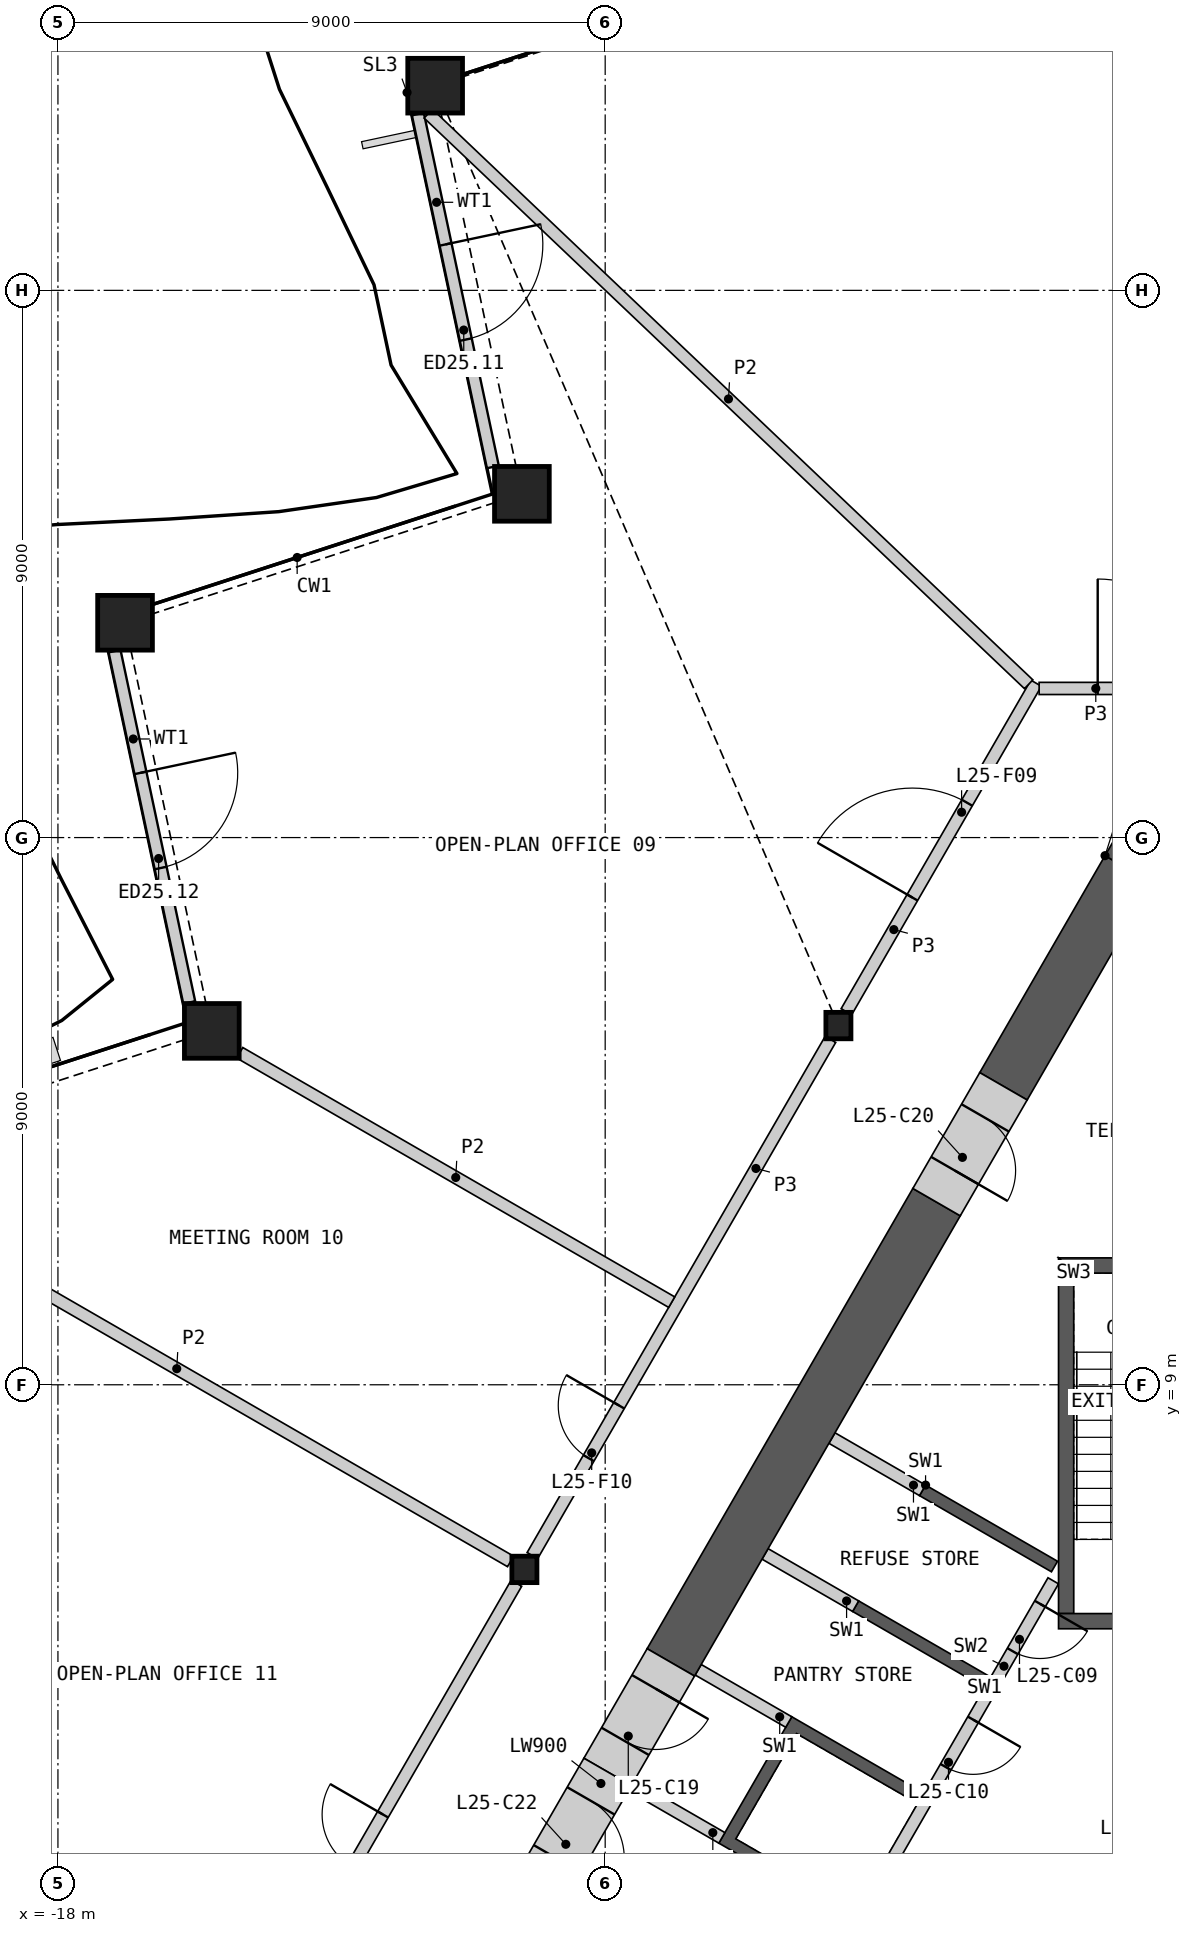
"""IFC4 building model, lengths in metres.
Left out: names, types, materials, properties, quantities, classifications, styles, units other than length and angle.
Written with IfcOpenShell. Run it as: python <this file> out.ifc"""

import sys

from ifc_helpers import new_model, si_unit, direction, frame, frame_2d, origin, origin_2d, place, context, subcontext, project, spatial, polyline, rectangle, hollow_rectangle, i_section, outline, extrude, element, fill, save


model = new_model("IFC4")
c1 = context("Model", 3, precision=1e-05, world=origin(), true_north=direction((0.0, 1.0)))
c2 = subcontext(c1, "Body", "Model", "MODEL_VIEW")
j1 = project(units=[si_unit("LENGTHUNIT", "METRE"), si_unit("PLANEANGLEUNIT", "RADIAN")], contexts=[c1])
p1 = place(None, origin())
s1 = spatial("IfcSite", under=j1, at=p1, CompositionType="ELEMENT")
p2 = place(p1, origin())
s2 = spatial("IfcBuilding", under=s1, at=p2, CompositionType="ELEMENT")
p3 = place(p2, frame((0.0, 0.0, 120.6)))
s3 = spatial("IfcBuildingStorey", under=s2, at=p3, CompositionType="ELEMENT", Elevation=120.6)
for number, where, z_axis, x_axis in (
    (1, (-11.796, 30.366, 0.0), (0.0, 0.0, 1.0), (1.0, 0.0, 0.0)),
    (2, (-10.37, 23.654, 0.0), (0.0, 0.0, 1.0), (1.0, 0.0, 0.0)),
    (3, (-16.896, 21.533, 0.0), (0.0, 0.0, 1.0), (1.0, 0.0, 0.0)),
    (4, (-15.469, 14.82, 0.0), (0.0, 0.0, 1.0), (1.0, 0.0, 0.0)),
):
    element("IfcColumn", number, at=place(p3, frame(where, z_axis=z_axis, x_axis=x_axis)), inside=s3, PredefinedType="COLUMN", context=c2, shape_type="SweptSolid", body=[
        extrude(hollow_rectangle(XDim=0.9, YDim=0.9, WallThickness=0.06, at=origin_2d()), origin(), (0.0, 0.0, 1.0), 4.2),
    ])
for number, where, z_axis, x_axis in (
    (5, (-5.164, 14.908, 0.0), (0.0, 0.0, 1.0), (1.0, 0.0, 0.0)),
    (6, (-10.328, 5.963, 0.0), (0.0, 0.0, 1.0), (1.0, 0.0, 0.0)),
):
    element("IfcColumn", number, at=place(p3, frame(where, z_axis=z_axis, x_axis=x_axis)), inside=s3, PredefinedType="COLUMN", context=c2, shape_type="SweptSolid", body=[
        extrude(i_section(OverallWidth=0.412, OverallDepth=0.435, WebThickness=0.036, FlangeThickness=0.057, at=origin_2d()), origin(), (0.0, 0.0, 1.0), 4.2),
    ])
p4 = place(p3, frame((-12.081, 29.9, 0.0), z_axis=(0.0, 0.0, 1.0), x_axis=(0.207890739357, -0.97815205387, 0.0)))
e7 = element("IfcWall", 7, at=p4, inside=s3, PredefinedType="SOLIDWALL", context=c2, shape_type="SweptSolid", body=[
    extrude(rectangle(XDim=5.934, YDim=0.2, at=frame_2d((2.967, 0.0))), origin(), (0.0, 0.0, 1.0), 3.189),
])
p5 = place(p4, frame((2.192, 0.0, 0.0)))
e8 = element("IfcOpeningElement", 8, at=p5, cuts=e7, PredefinedType="OPENING", context=c2, shape_type="SweptSolid", body=[
    extrude(rectangle(XDim=1.6, YDim=2.4, at=frame_2d((0.8, 1.2))), frame((0.0, 0.11, 0.0), z_axis=(0.0, -1.0, 0.0), x_axis=(1.0, 0.0, 0.0)), (0.0, 0.0, 1.0), 0.22),
])
p6 = place(p3, frame((-17.069, 21.066, 0.0), z_axis=(0.0, 0.0, 1.0), x_axis=(0.207917562075, -0.978146352741, 0.0)))
e9 = element("IfcWall", 9, at=p6, inside=s3, PredefinedType="SOLIDWALL", context=c2, shape_type="SweptSolid", body=[
    extrude(rectangle(XDim=5.909, YDim=0.2, at=frame_2d((2.954, 0.0))), origin(), (0.0, 0.0, 1.0), 3.189),
])
p7 = place(p6, frame((2.047, 0.0, 0.0)))
e10 = element("IfcOpeningElement", 10, at=p7, cuts=e9, PredefinedType="OPENING", context=c2, shape_type="SweptSolid", body=[
    extrude(rectangle(XDim=1.6, YDim=2.4, at=frame_2d((0.8, 1.2))), frame((0.0, 0.11, 0.0), z_axis=(0.0, -1.0, 0.0), x_axis=(1.0, 0.0, 0.0)), (0.0, 0.0, 1.0), 0.22),
])
p8 = place(p3, origin())
e11 = element("IfcWall", 11, at=p8, inside=s3, PredefinedType="SHEAR", context=c2, shape_type="SweptSolid", body=[
    extrude(outline(polyline([(-4.96, 0.208), (-7.131, 1.461), (-5.931, 3.54), (-3.76, 2.287), (-3.861, 2.113), (-5.852, 3.263), (-6.852, 1.531), (-4.861, 0.381), (-4.96, 0.208)])), origin(), (0.0, 0.0, 1.0), 3.8),
])
p9 = place(p3, origin())
e12 = element("IfcWall", 12, at=p9, inside=s3, PredefinedType="SHEAR", context=c2, shape_type="SweptSolid", body=[
    extrude(outline(polyline([(-2.76, 4.019), (-4.931, 5.272), (-4.831, 5.445), (-2.66, 4.192), (-2.76, 4.019)])), origin(), (0.0, 0.0, 1.0), 3.8),
])
p10 = place(p3, origin())
e13 = element("IfcWall", 13, at=p10, inside=s3, PredefinedType="SHEAR", context=c2, shape_type="SweptSolid", body=[
    extrude(outline(polyline([(-3.731, 7.35), (-1.561, 6.097), (-1.66, 5.924), (-3.831, 7.177), (-3.731, 7.35)])), origin(), (0.0, 0.0, 1.0), 3.8),
])
p11 = place(p3, frame((-1.631, 5.776, 0.0), z_axis=(0.0, 0.0, 1.0), x_axis=(-0.499992876559, -0.866029516466, 0.0)))
e14 = element("IfcWall", 14, at=p11, inside=s3, PredefinedType="SOLIDWALL", context=c2, shape_type="SweptSolid", body=[
    extrude(rectangle(XDim=6.486, YDim=0.2, at=frame_2d((3.243, 0.0))), origin(), (0.0, 0.0, 1.0), 3.8),
])
p12 = place(p11, frame((0.437, 0.0, 0.0)))
e15 = element("IfcOpeningElement", 15, at=p12, cuts=e14, PredefinedType="OPENING", context=c2, shape_type="SweptSolid", body=[
    extrude(rectangle(XDim=0.9, YDim=2.1, at=frame_2d((0.45, 1.05))), frame((0.0, 0.11, 0.0), z_axis=(0.0, -1.0, 0.0), x_axis=(1.0, 0.0, 0.0)), (0.0, 0.0, 1.0), 0.22),
])
p13 = place(p11, frame((2.637, 0.0, 0.0)))
e16 = element("IfcOpeningElement", 16, at=p13, cuts=e14, PredefinedType="OPENING", context=c2, shape_type="SweptSolid", body=[
    extrude(rectangle(XDim=0.9, YDim=2.1, at=frame_2d((0.45, 1.05))), frame((0.0, 0.11, 0.0), z_axis=(0.0, -1.0, 0.0), x_axis=(1.0, 0.0, 0.0)), (0.0, 0.0, 1.0), 0.22),
])
for number, where, z_axis, x_axis in (
    (17, (-3.781, 7.263, 0.0), (0.0, 0.0, 1.0), (-0.866, 0.5, 0.0)),
    (18, (-4.881, 5.358, 0.0), (0.0, 0.0, 1.0), (-0.866, 0.5, 0.0)),
):
    element("IfcWall", number, at=place(p3, frame(where, z_axis=z_axis, x_axis=x_axis)), inside=s3, PredefinedType="SHEAR", context=c2, shape_type="SweptSolid", body=[
        extrude(rectangle(XDim=1.72, YDim=0.2, at=frame_2d((0.86, 0.0))), origin(), (0.0, 0.0, 1.0), 3.8),
    ])
p14 = place(p3, frame((-5.981, 3.453, 0.0), z_axis=(0.0, 0.0, 1.0), x_axis=(-0.866060346521, 0.499939472521, 0.0)))
e19 = element("IfcWall", 19, at=p14, inside=s3, PredefinedType="SHEAR", context=c2, shape_type="SweptSolid", body=[
    extrude(rectangle(XDim=1.72, YDim=0.2, at=frame_2d((0.86, 0.0))), origin(), (0.0, 0.0, 1.0), 3.8),
])
p15 = place(p3, frame((-7.081, 1.548, 0.0), z_axis=(0.0, 0.0, 1.0), x_axis=(-0.865963414263, 0.500107353632, 0.0)))
e20 = element("IfcWall", 20, at=p15, inside=s3, PredefinedType="SHEAR", context=c2, shape_type="SweptSolid", body=[
    extrude(rectangle(XDim=1.72, YDim=0.2, at=frame_2d((0.86, 0.0))), origin(), (0.0, 0.0, 1.0), 3.8),
])
p16 = place(p3, origin())
e21 = element("IfcWall", 21, at=p16, inside=s3, PredefinedType="SHEAR", context=c2, shape_type="SweptSolid", body=[
    extrude(outline(polyline([(1.544, 11.087), (-1.544, 11.087), (-1.294, 10.837), (1.294, 10.837), (1.544, 11.087)])), origin(), (0.0, 0.0, 1.0), 3.8),
])
p17 = place(p3, origin())
e22 = element("IfcWall", 22, at=p17, inside=s3, PredefinedType="SHEAR", context=c2, shape_type="SweptSolid", body=[
    extrude(outline(polyline([(-1.294, 10.837), (-1.544, 11.087), (-1.544, 5.237), (-1.294, 5.237), (-1.294, 10.837)])), origin(), (0.0, 0.0, 1.0), 3.8),
])
p18 = place(p3, frame((1.544, 5.112, 0.0), z_axis=(0.0, 0.0, 1.0), x_axis=(-1.0, 0.0, 0.0)))
e23 = element("IfcWall", 23, at=p18, inside=s3, PredefinedType="SHEAR", context=c2, shape_type="SweptSolid", body=[
    extrude(rectangle(XDim=3.088, YDim=0.25, at=frame_2d((1.544, 0.0))), origin(), (0.0, 0.0, 1.0), 3.8),
])
p19 = place(p18, frame((0.994, 0.0, 0.0)))
e24 = element("IfcOpeningElement", 24, at=p19, cuts=e23, PredefinedType="OPENING", context=c2, shape_type="SweptSolid", body=[
    extrude(rectangle(XDim=1.1, YDim=2.1, at=frame_2d((0.55, 1.05))), frame((0.0, 0.135, 0.0), z_axis=(0.0, -1.0, 0.0), x_axis=(1.0, 0.0, 0.0)), (0.0, 0.0, 1.0), 0.27),
])
p20 = place(p3, frame((-3.55, 12.004, 0.0), z_axis=(0.0, 0.0, 1.0), x_axis=(-0.499993245289, -0.866029303583, 0.0)))
e25 = element("IfcWall", 25, at=p20, inside=s3, PredefinedType="SHEAR", context=c2, shape_type="SweptSolid", body=[
    extrude(rectangle(XDim=8.741, YDim=0.9, at=frame_2d((4.37, 0.0))), origin(), (0.0, 0.0, 1.0), 3.8),
])
p21 = place(p3, frame((-0.39, 17.478, 0.0), z_axis=(0.0, 0.0, 1.0), x_axis=(-0.50001992892, -0.866013897511, 0.0)))
e26 = element("IfcWall", 26, at=p21, inside=s3, PredefinedType="SHEAR", context=c2, shape_type="SweptSolid", body=[
    extrude(rectangle(XDim=4.12, YDim=0.9, at=frame_2d((2.06, 0.0))), origin(), (0.0, 0.0, 1.0), 3.8),
])
p22 = place(p3, origin())
e27 = element("IfcWall", 27, at=p22, inside=s3, PredefinedType="SHEAR", context=c2, shape_type="SweptSolid", body=[
    extrude(outline(polyline([(-0.779, 17.703), (0.0, 19.052), (0.779, 17.703), (0.0, 17.253), (-0.779, 17.703)])), origin(), (0.0, 0.0, 1.0), 3.8),
])
p23 = place(p3, frame((-7.92, 4.434, 0.0), z_axis=(0.0, 0.0, 1.0), x_axis=(-0.499939227269, -0.866060488094, 0.0)))
e28 = element("IfcWall", 28, at=p23, inside=s3, PredefinedType="SHEAR", context=c2, shape_type="SweptSolid", body=[
    extrude(rectangle(XDim=2.08, YDim=0.9, at=frame_2d((1.04, 0.0))), origin(), (0.0, 0.0, 1.0), 3.8),
])
p24 = place(p23, frame((0.5, 0.0, 0.0)))
e29 = element("IfcOpeningElement", 29, at=p24, cuts=e28, PredefinedType="OPENING", context=c2, shape_type="SweptSolid", body=[
    extrude(rectangle(XDim=1.0, YDim=2.1, at=frame_2d((0.5, 1.05))), frame((0.0, 0.46, 0.0), z_axis=(0.0, -1.0, 0.0), x_axis=(1.0, 0.0, 0.0)), (0.0, 0.0, 1.0), 0.92),
])
p25 = place(p3, frame((-2.45, 13.909, 0.0), z_axis=(0.0, 0.0, 1.0), x_axis=(-0.50002983664, -0.866008176907, 0.0)))
e30 = element("IfcWall", 30, at=p25, inside=s3, PredefinedType="SHEAR", context=c2, shape_type="SweptSolid", body=[
    extrude(rectangle(XDim=2.2, YDim=0.9, at=frame_2d((1.1, 0.0))), origin(), (0.0, 0.0, 1.0), 3.8),
])
p26 = place(p25, frame((0.6, 0.0, 0.0)))
e31 = element("IfcOpeningElement", 31, at=p26, cuts=e30, PredefinedType="OPENING", context=c2, shape_type="SweptSolid", body=[
    extrude(rectangle(XDim=1.0, YDim=2.1, at=frame_2d((0.5, 1.05))), frame((0.0, 0.46, 0.0), z_axis=(0.0, -1.0, 0.0), x_axis=(1.0, 0.0, 0.0)), (0.0, 0.0, 1.0), 0.92),
])
p27 = place(p3, frame((-8.96, 2.633, 0.0), z_axis=(0.0, 0.0, 1.0), x_axis=(-0.50002983664, -0.866008176907, 0.0)))
e32 = element("IfcWall", 32, at=p27, inside=s3, PredefinedType="SHEAR", context=c2, shape_type="SweptSolid", body=[
    extrude(rectangle(XDim=2.2, YDim=0.9, at=frame_2d((1.1, 0.0))), origin(), (0.0, 0.0, 1.0), 3.8),
])
p28 = place(p27, frame((0.55, 0.0, 0.0)))
e33 = element("IfcOpeningElement", 33, at=p28, cuts=e32, PredefinedType="OPENING", context=c2, shape_type="SweptSolid", body=[
    extrude(rectangle(XDim=1.1, YDim=2.1, at=frame_2d((0.55, 1.05))), frame((0.0, 0.46, 0.0), z_axis=(0.0, -1.0, 0.0), x_axis=(1.0, 0.0, 0.0)), (0.0, 0.0, 1.0), 0.92),
])
p29 = place(p3, frame((-10.197, 6.19, 0.0), z_axis=(0.0, 0.0, 1.0), x_axis=(0.500012035596, 0.866018454918, 0.0)))
e34 = element("IfcWall", 34, at=p29, inside=s3, PredefinedType="PARTITIONING", context=c2, shape_type="SweptSolid", body=[
    extrude(rectangle(XDim=9.803, YDim=0.2, at=frame_2d((4.902, 0.0))), origin(), (0.0, 0.0, 1.0), 3.8),
])
p30 = place(p29, frame((1.851, 0.0, 0.0)))
e35 = element("IfcOpeningElement", 35, at=p30, cuts=e34, PredefinedType="OPENING", context=c2, shape_type="SweptSolid", body=[
    extrude(rectangle(XDim=1.0, YDim=2.1, at=frame_2d((0.5, 1.05))), frame((0.0, 0.11, 0.0), z_axis=(0.0, -1.0, 0.0), x_axis=(1.0, 0.0, 0.0)), (0.0, 0.0, 1.0), 0.22),
])
p31 = place(p3, frame((-15.402, -2.823, 0.0), z_axis=(0.0, 0.0, 1.0), x_axis=(0.500023237168, 0.866011987384, 0.0)))
e36 = element("IfcWall", 36, at=p31, inside=s3, PredefinedType="PARTITIONING", context=c2, shape_type="SweptSolid", body=[
    extrude(rectangle(XDim=9.883, YDim=0.2, at=frame_2d((4.942, 0.0))), origin(), (0.0, 0.0, 1.0), 3.8),
])
p32 = place(p31, frame((4.492, 0.0, 0.0)))
e37 = element("IfcOpeningElement", 37, at=p32, cuts=e36, PredefinedType="OPENING", context=c2, shape_type="SweptSolid", body=[
    extrude(rectangle(XDim=1.0, YDim=2.1, at=frame_2d((0.5, 1.05))), frame((0.0, 0.11, 0.0), z_axis=(0.0, -1.0, 0.0), x_axis=(1.0, 0.0, 0.0)), (0.0, 0.0, 1.0), 0.22),
])
p33 = place(p3, frame((-5.033, 15.135, 0.0), z_axis=(0.0, 0.0, 1.0), x_axis=(0.499980978912, 0.866036385336, 0.0)))
e38 = element("IfcWall", 38, at=p33, inside=s3, PredefinedType="PARTITIONING", context=c2, shape_type="SweptSolid", body=[
    extrude(rectangle(XDim=6.24, YDim=0.2, at=frame_2d((3.12, 0.0))), origin(), (0.0, 0.0, 1.0), 3.8),
])
p34 = place(p33, frame((2.169, 0.0, 0.0)))
e39 = element("IfcOpeningElement", 39, at=p34, cuts=e38, PredefinedType="OPENING", context=c2, shape_type="SweptSolid", body=[
    extrude(rectangle(XDim=1.8, YDim=2.1, at=frame_2d((0.9, 1.05))), frame((0.0, 0.11, 0.0), z_axis=(0.0, -1.0, 0.0), x_axis=(1.0, 0.0, 0.0)), (0.0, 0.0, 1.0), 0.22),
])
p35 = place(p3, frame((-1.863, 20.453, 0.0), z_axis=(0.0, 0.0, 1.0), x_axis=(1.0, 0.0, 0.0)))
e40 = element("IfcWall", 40, at=p35, inside=s3, PredefinedType="PARTITIONING", context=c2, shape_type="SweptSolid", body=[
    extrude(rectangle(XDim=3.726, YDim=0.2, at=frame_2d((1.863, 0.0))), origin(), (0.0, 0.0, 1.0), 3.8),
])
p36 = place(p35, frame((0.963, 0.0, 0.0)))
e41 = element("IfcOpeningElement", 41, at=p36, cuts=e40, PredefinedType="OPENING", context=c2, shape_type="SweptSolid", body=[
    extrude(rectangle(XDim=1.8, YDim=2.1, at=frame_2d((0.9, 1.05))), frame((0.0, 0.11, 0.0), z_axis=(0.0, -1.0, 0.0), x_axis=(1.0, 0.0, 0.0)), (0.0, 0.0, 1.0), 0.22),
])
p37 = place(p3, frame((-11.909, 29.906, 0.0), z_axis=(0.0, 0.0, 1.0), x_axis=(0.724819524984, -0.688938789881, 0.0)))
e42 = element("IfcWall", 42, at=p37, inside=s3, PredefinedType="PARTITIONING", context=c2, shape_type="SweptSolid", body=[
    extrude(rectangle(XDim=13.622, YDim=0.2, at=frame_2d((6.811, 0.0))), origin(), (0.0, 0.0, 1.0), 2.885),
])
p38 = place(p3, frame((-26.636, 3.79, 0.0), z_axis=(0.0, 0.0, 1.0), x_axis=(0.866029074283, -0.499993642455, 0.0)))
e43 = element("IfcWall", 43, at=p38, inside=s3, PredefinedType="PARTITIONING", context=c2, shape_type="SweptSolid", body=[
    extrude(rectangle(XDim=12.936, YDim=0.2, at=frame_2d((6.468, 0.0))), origin(), (0.0, 0.0, 1.0), 2.885),
])
p39 = place(p3, frame((-21.536, 12.434, 0.0), z_axis=(0.0, 0.0, 1.0), x_axis=(0.86602461759, -0.500001361726, 0.0)))
e44 = element("IfcWall", 44, at=p39, inside=s3, PredefinedType="PARTITIONING", context=c2, shape_type="SweptSolid", body=[
    extrude(rectangle(XDim=12.679, YDim=0.2, at=frame_2d((6.34, 0.0))), origin(), (0.0, 0.0, 1.0), 2.885),
])
p40 = place(p3, frame((-15.01, 14.46, 0.0), z_axis=(0.0, 0.0, 1.0), x_axis=(0.86602003489, -0.500009299083, 0.0)))
e45 = element("IfcWall", 45, at=p40, inside=s3, PredefinedType="PARTITIONING", context=c2, shape_type="SweptSolid", body=[
    extrude(rectangle(XDim=8.202, YDim=0.2, at=frame_2d((4.101, 0.0))), origin(), (0.0, 0.0, 1.0), 2.885),
])
p41 = place(p5, origin())
e46 = element("IfcDoor", 46, at=p41, inside=s3, OperationType="DOUBLE_DOOR_SINGLE_SWING", PredefinedType="DOOR", context=c2, shape_type="SweptSolid", body=[
    extrude(rectangle(XDim=1.6, YDim=2.4, at=frame_2d((0.8, 1.2))), frame((0.0, 0.025, 0.0), z_axis=(0.0, -1.0, 0.0), x_axis=(1.0, 0.0, 0.0)), (0.0, 0.0, 1.0), 0.05),
])
fill(e8, e46)
p42 = place(p7, origin())
e47 = element("IfcDoor", 47, at=p42, inside=s3, OperationType="DOUBLE_DOOR_SINGLE_SWING", PredefinedType="DOOR", context=c2, shape_type="SweptSolid", body=[
    extrude(rectangle(XDim=1.6, YDim=2.4, at=frame_2d((0.8, 1.2))), frame((0.0, 0.025, 0.0), z_axis=(0.0, -1.0, 0.0), x_axis=(1.0, 0.0, 0.0)), (0.0, 0.0, 1.0), 0.05),
])
fill(e10, e47)
p43 = place(p12, origin())
e48 = element("IfcDoor", 48, at=p43, inside=s3, OperationType="SINGLE_SWING_LEFT", PredefinedType="DOOR", context=c2, shape_type="SweptSolid", body=[
    extrude(rectangle(XDim=0.9, YDim=2.1, at=frame_2d((0.45, 1.05))), frame((0.0, 0.025, 0.0), z_axis=(0.0, -1.0, 0.0), x_axis=(1.0, 0.0, 0.0)), (0.0, 0.0, 1.0), 0.05),
])
fill(e15, e48)
p44 = place(p13, origin())
e49 = element("IfcDoor", 49, at=p44, inside=s3, OperationType="SINGLE_SWING_LEFT", PredefinedType="DOOR", context=c2, shape_type="SweptSolid", body=[
    extrude(rectangle(XDim=0.9, YDim=2.1, at=frame_2d((0.45, 1.05))), frame((0.0, 0.025, 0.0), z_axis=(0.0, -1.0, 0.0), x_axis=(1.0, 0.0, 0.0)), (0.0, 0.0, 1.0), 0.05),
])
fill(e16, e49)
p45 = place(p24, origin())
e50 = element("IfcDoor", 50, at=p45, inside=s3, OperationType="SINGLE_SWING_LEFT", PredefinedType="DOOR", context=c2, shape_type="SweptSolid", body=[
    extrude(rectangle(XDim=1.0, YDim=2.1, at=frame_2d((0.5, 1.05))), frame((0.0, 0.205, 0.0), z_axis=(0.0, -1.0, 0.0), x_axis=(1.0, 0.0, 0.0)), (0.0, 0.0, 1.0), 0.05),
])
fill(e29, e50)
p46 = place(p26, origin())
e51 = element("IfcDoor", 51, at=p46, inside=s3, OperationType="SINGLE_SWING_RIGHT", PredefinedType="DOOR", context=c2, shape_type="SweptSolid", body=[
    extrude(rectangle(XDim=1.0, YDim=2.1, at=frame_2d((0.5, 1.05))), frame((0.0, 0.205, 0.0), z_axis=(0.0, -1.0, 0.0), x_axis=(1.0, 0.0, 0.0)), (0.0, 0.0, 1.0), 0.05),
])
fill(e31, e51)
p47 = place(p28, origin())
e52 = element("IfcDoor", 52, at=p47, inside=s3, OperationType="SINGLE_SWING_RIGHT", PredefinedType="DOOR", context=c2, shape_type="SweptSolid", body=[
    extrude(rectangle(XDim=1.1, YDim=2.1, at=frame_2d((0.55, 1.05))), frame((0.0, 0.205, 0.0), z_axis=(0.0, -1.0, 0.0), x_axis=(1.0, 0.0, 0.0)), (0.0, 0.0, 1.0), 0.05),
])
fill(e33, e52)
p48 = place(p36, origin())
e53 = element("IfcDoor", 53, at=p48, inside=s3, OperationType="DOUBLE_DOOR_SINGLE_SWING", PredefinedType="DOOR", context=c2, shape_type="SweptSolid", body=[
    extrude(rectangle(XDim=1.8, YDim=2.1, at=frame_2d((0.9, 1.05))), frame((0.0, 0.025, 0.0), z_axis=(0.0, -1.0, 0.0), x_axis=(1.0, 0.0, 0.0)), (0.0, 0.0, 1.0), 0.05),
])
fill(e41, e53)
p49 = place(p34, origin())
e54 = element("IfcDoor", 54, at=p49, inside=s3, OperationType="DOUBLE_DOOR_SINGLE_SWING", PredefinedType="DOOR", context=c2, shape_type="SweptSolid", body=[
    extrude(rectangle(XDim=1.8, YDim=2.1, at=frame_2d((0.9, 1.05))), frame((0.0, 0.025, 0.0), z_axis=(0.0, -1.0, 0.0), x_axis=(1.0, 0.0, 0.0)), (0.0, 0.0, 1.0), 0.05),
])
fill(e39, e54)
p50 = place(p30, origin())
e55 = element("IfcDoor", 55, at=p50, inside=s3, OperationType="SINGLE_SWING_RIGHT", PredefinedType="DOOR", context=c2, shape_type="SweptSolid", body=[
    extrude(rectangle(XDim=1.0, YDim=2.1, at=frame_2d((0.5, 1.05))), frame((0.0, 0.025, 0.0), z_axis=(0.0, -1.0, 0.0), x_axis=(1.0, 0.0, 0.0)), (0.0, 0.0, 1.0), 0.05),
])
fill(e35, e55)
p51 = place(p32, origin())
e56 = element("IfcDoor", 56, at=p51, inside=s3, OperationType="SINGLE_SWING_RIGHT", PredefinedType="DOOR", context=c2, shape_type="SweptSolid", body=[
    extrude(rectangle(XDim=1.0, YDim=2.1, at=frame_2d((0.5, 1.05))), frame((0.0, 0.025, 0.0), z_axis=(0.0, -1.0, 0.0), x_axis=(1.0, 0.0, 0.0)), (0.0, 0.0, 1.0), 0.05),
])
fill(e37, e56)
save(model, sys.argv[1])
